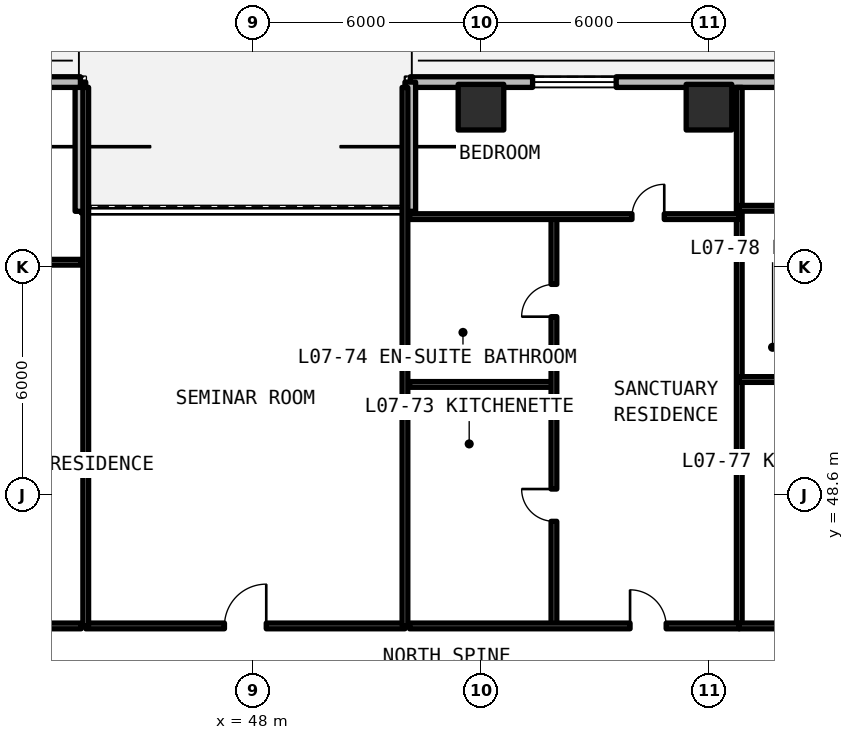
"""IFC4 building model, lengths in metres.
Left out: names, types, materials, properties, quantities, classifications, styles, units other than length and angle.
Written with IfcOpenShell. Run it as: python <this file> out.ifc"""

import sys

from ifc_helpers import new_model, si_unit, direction, frame, frame_2d, origin, origin_2d, place, context, subcontext, project, spatial, rectangle, extrude, element, fill, save


model = new_model("IFC4")
c1 = context("Model", 3, precision=1e-05, world=origin(), true_north=direction((0.0, 1.0)))
c2 = subcontext(c1, "Body", "Model", "MODEL_VIEW")
j1 = project(units=[si_unit("LENGTHUNIT", "METRE"), si_unit("PLANEANGLEUNIT", "RADIAN")], contexts=[c1])
p1 = place(None, origin())
s1 = spatial("IfcSite", under=j1, at=p1, CompositionType="ELEMENT")
p2 = place(p1, origin())
s2 = spatial("IfcBuilding", under=s1, at=p2, CompositionType="ELEMENT")
p3 = place(p2, frame((0.0, 0.0, 29.04)))
s3 = spatial("IfcBuildingStorey", under=s2, at=p3, CompositionType="ELEMENT", Elevation=29.04)
for number, where, z_axis, x_axis in (
    (1, (54.0, 58.8, -0.24), (0.0, 0.0, 1.0), (1.0, 0.0, 0.0)),
    (2, (60.0, 58.8, -0.24), (0.0, 0.0, 1.0), (1.0, 0.0, 0.0)),
):
    element("IfcColumn", number, at=place(p3, frame(where, z_axis=z_axis, x_axis=x_axis)), inside=s3, PredefinedType="COLUMN", context=c2, shape_type="SweptSolid", body=[
        extrude(rectangle(XDim=1.2, YDim=1.2, at=origin_2d()), origin(), (0.0, 0.0, 1.0), 3.54),
    ])
p4 = place(p3, frame((96.542, 59.46, 0.0), z_axis=(0.0, 0.0, 1.0), x_axis=(-1.0, 0.0, 0.0)))
e3 = element("IfcWall", 3, at=p4, inside=s3, PredefinedType="SOLIDWALL", context=c2, shape_type="SweptSolid", body=[
    extrude(rectangle(XDim=44.402, YDim=0.28, at=frame_2d((22.201, 0.0))), origin(), (0.0, 0.0, 1.0), 3.08),
])
p5 = place(p4, frame((38.984, 0.0, 0.78)))
e4 = element("IfcOpeningElement", 4, at=p5, cuts=e3, PredefinedType="OPENING", context=c2, shape_type="SweptSolid", body=[
    extrude(rectangle(XDim=2.2, YDim=1.66, at=frame_2d((1.1, 0.83))), frame((0.0, 0.15, 0.0), z_axis=(0.0, -1.0, 0.0), x_axis=(1.0, 0.0, 0.0)), (0.0, 0.0, 1.0), 0.3),
])
p6 = place(p4, frame((31.448, 0.0, 0.78)))
e5 = element("IfcOpeningElement", 5, at=p6, cuts=e3, PredefinedType="OPENING", context=c2, shape_type="SweptSolid", body=[
    extrude(rectangle(XDim=2.2, YDim=1.66, at=frame_2d((1.1, 0.83))), frame((0.0, 0.15, 0.0), z_axis=(0.0, -1.0, 0.0), x_axis=(1.0, 0.0, 0.0)), (0.0, 0.0, 1.0), 0.3),
])
p7 = place(p4, frame((21.032, 0.0, 0.78)))
e6 = element("IfcOpeningElement", 6, at=p7, cuts=e3, PredefinedType="OPENING", context=c2, shape_type="SweptSolid", body=[
    extrude(rectangle(XDim=2.2, YDim=1.66, at=frame_2d((1.1, 0.83))), frame((0.0, 0.15, 0.0), z_axis=(0.0, -1.0, 0.0), x_axis=(1.0, 0.0, 0.0)), (0.0, 0.0, 1.0), 0.3),
])
p8 = place(p4, frame((13.326, 0.0, 0.78)))
e7 = element("IfcOpeningElement", 7, at=p8, cuts=e3, PredefinedType="OPENING", context=c2, shape_type="SweptSolid", body=[
    extrude(rectangle(XDim=2.2, YDim=1.66, at=frame_2d((1.1, 0.83))), frame((0.0, 0.15, 0.0), z_axis=(0.0, -1.0, 0.0), x_axis=(1.0, 0.0, 0.0)), (0.0, 0.0, 1.0), 0.3),
])
p9 = place(p4, frame((3.38, 0.0, 0.78)))
e8 = element("IfcOpeningElement", 8, at=p9, cuts=e3, PredefinedType="OPENING", context=c2, shape_type="SweptSolid", body=[
    extrude(rectangle(XDim=2.2, YDim=1.66, at=frame_2d((1.1, 0.83))), frame((0.0, 0.15, 0.0), z_axis=(0.0, -1.0, 0.0), x_axis=(1.0, 0.0, 0.0)), (0.0, 0.0, 1.0), 0.3),
])
for number, where, z_axis, x_axis in (
    (9, (52.14, 59.46, 0.0), (0.0, 0.0, 1.0), (0.0, -1.0, 0.0)),
    (10, (43.46, 56.06, 0.0), (0.0, 0.0, 1.0), (0.0, 1.0, 0.0)),
):
    element("IfcWall", number, at=place(p3, frame(where, z_axis=z_axis, x_axis=x_axis)), inside=s3, PredefinedType="SOLIDWALL", context=c2, shape_type="SweptSolid", body=[
        extrude(rectangle(XDim=3.4, YDim=0.28, at=frame_2d((1.7, 0.0))), origin(), (0.0, 0.0, 1.0), 3.08),
    ])
p10 = place(p3, frame((43.46, 59.46, 0.0), z_axis=(0.0, 0.0, 1.0), x_axis=(-1.0, 0.0, 0.0)))
e11 = element("IfcWall", 11, at=p10, inside=s3, PredefinedType="SOLIDWALL", context=c2, shape_type="SweptSolid", body=[
    extrude(rectangle(XDim=22.602, YDim=0.28, at=frame_2d((11.301, 0.0))), origin(), (0.0, 0.0, 1.0), 3.08),
])
p11 = place(p10, frame((9.551, 0.0, 0.0)))
e12 = element("IfcOpeningElement", 12, at=p11, cuts=e11, PredefinedType="OPENING", context=c2, shape_type="SweptSolid", body=[
    extrude(rectangle(XDim=1.5, YDim=2.2, at=frame_2d((0.75, 1.1))), frame((0.0, 0.15, 0.0), z_axis=(0.0, -1.0, 0.0), x_axis=(1.0, 0.0, 0.0)), (0.0, 0.0, 1.0), 0.3),
])
p12 = place(p10, frame((20.346, 0.0, 0.78)))
e13 = element("IfcOpeningElement", 13, at=p12, cuts=e11, PredefinedType="OPENING", context=c2, shape_type="SweptSolid", body=[
    extrude(rectangle(XDim=1.4, YDim=1.65, at=frame_2d((0.7, 0.825))), frame((0.0, 0.15, 0.0), z_axis=(0.0, -1.0, 0.0), x_axis=(1.0, 0.0, 0.0)), (0.0, 0.0, 1.0), 0.3),
])
p13 = place(p10, frame((15.999, 0.0, 0.78)))
e14 = element("IfcOpeningElement", 14, at=p13, cuts=e11, PredefinedType="OPENING", context=c2, shape_type="SweptSolid", body=[
    extrude(rectangle(XDim=0.85, YDim=1.65, at=frame_2d((0.425, 0.825))), frame((0.0, 0.15, 0.0), z_axis=(0.0, -1.0, 0.0), x_axis=(1.0, 0.0, 0.0)), (0.0, 0.0, 1.0), 0.3),
])
p14 = place(p10, frame((14.163, 0.0, 0.78)))
e15 = element("IfcOpeningElement", 15, at=p14, cuts=e11, PredefinedType="OPENING", context=c2, shape_type="SweptSolid", body=[
    extrude(rectangle(XDim=0.85, YDim=1.65, at=frame_2d((0.425, 0.825))), frame((0.0, 0.15, 0.0), z_axis=(0.0, -1.0, 0.0), x_axis=(1.0, 0.0, 0.0)), (0.0, 0.0, 1.0), 0.3),
])
p15 = place(p10, frame((2.368, 0.0, 0.78)))
e16 = element("IfcOpeningElement", 16, at=p15, cuts=e11, PredefinedType="OPENING", context=c2, shape_type="SweptSolid", body=[
    extrude(rectangle(XDim=2.2, YDim=1.66, at=frame_2d((1.1, 0.83))), frame((0.0, 0.15, 0.0), z_axis=(0.0, -1.0, 0.0), x_axis=(1.0, 0.0, 0.0)), (0.0, 0.0, 1.0), 0.3),
])
p16 = place(p3, frame((43.6, 45.15, 0.0), z_axis=(0.0, 0.0, 1.0), x_axis=(1.0, 0.0, 0.0)))
e17 = element("IfcWall", 17, at=p16, inside=s3, PredefinedType="SOLIDWALL", context=c2, shape_type="SweptSolid", body=[
    extrude(rectangle(XDim=8.4, YDim=0.15, at=frame_2d((4.2, 0.0))), origin(), (0.0, 0.0, 1.0), 2.35),
])
p17 = place(p16, frame((3.65, 0.0, 0.0)))
e18 = element("IfcOpeningElement", 18, at=p17, cuts=e17, PredefinedType="OPENING", context=c2, shape_type="SweptSolid", body=[
    extrude(rectangle(XDim=1.1, YDim=2.15, at=frame_2d((0.55, 1.075))), frame((0.0, 0.085, 0.0), z_axis=(0.0, -1.0, 0.0), x_axis=(1.0, 0.0, 0.0)), (0.0, 0.0, 1.0), 0.17),
])
for number, where, z_axis, x_axis in (
    (19, (43.6, 45.15, 0.0), (0.0, 0.0, 1.0), (0.0, 1.0, 0.0)),
    (20, (52.0, 45.15, 0.0), (0.0, 0.0, 1.0), (0.0, 1.0, 0.0)),
):
    element("IfcWall", number, at=place(p3, frame(where, z_axis=z_axis, x_axis=x_axis)), inside=s3, PredefinedType="SOLIDWALL", context=c2, shape_type="SweptSolid", body=[
        extrude(rectangle(XDim=14.17, YDim=0.15, at=frame_2d((7.085, 0.0))), origin(), (0.0, 0.0, 1.0), 2.35),
    ])
p18 = place(p3, frame((37.144, 54.72, 0.0), z_axis=(0.0, 0.0, 1.0), x_axis=(1.0, 0.0, 0.0)))
e21 = element("IfcWall", 21, at=p18, inside=s3, PredefinedType="PARTITIONING", context=c2, shape_type="SweptSolid", body=[
    extrude(rectangle(XDim=6.336, YDim=0.15, at=frame_2d((3.168, 0.0))), origin(), (0.0, 0.0, 1.0), 2.35),
])
p19 = place(p18, frame((3.86, 0.0, 0.0)))
e22 = element("IfcOpeningElement", 22, at=p19, cuts=e21, PredefinedType="OPENING", context=c2, shape_type="SweptSolid", body=[
    extrude(rectangle(XDim=0.85, YDim=2.1, at=frame_2d((0.425, 1.05))), frame((0.0, 0.085, 0.0), z_axis=(0.0, -1.0, 0.0), x_axis=(1.0, 0.0, 0.0)), (0.0, 0.0, 1.0), 0.17),
])
p20 = place(p3, frame((37.144, 45.15, 0.0), z_axis=(0.0, 0.0, 1.0), x_axis=(1.0, 0.0, 0.0)))
e23 = element("IfcWall", 23, at=p20, inside=s3, PredefinedType="SOLIDWALL", context=c2, shape_type="SweptSolid", body=[
    extrude(rectangle(XDim=6.336, YDim=0.15, at=frame_2d((3.168, 0.0))), origin(), (0.0, 0.0, 1.0), 2.35),
])
p21 = place(p20, frame((3.81, 0.0, 0.0)))
e24 = element("IfcOpeningElement", 24, at=p21, cuts=e23, PredefinedType="OPENING", context=c2, shape_type="SweptSolid", body=[
    extrude(rectangle(XDim=0.95, YDim=2.15, at=frame_2d((0.475, 1.075))), frame((0.0, 0.085, 0.0), z_axis=(0.0, -1.0, 0.0), x_axis=(1.0, 0.0, 0.0)), (0.0, 0.0, 1.0), 0.17),
])
p22 = place(p3, frame((60.796, 45.15, 0.0), z_axis=(0.0, 0.0, 1.0), x_axis=(0.0, 1.0, 0.0)))
e25 = element("IfcWall", 25, at=p22, inside=s3, PredefinedType="SOLIDWALL", context=c2, shape_type="SweptSolid", body=[
    extrude(rectangle(XDim=14.17, YDim=0.15, at=frame_2d((7.085, 0.0))), origin(), (0.0, 0.0, 1.0), 2.35),
])
p23 = place(p3, frame((52.12, 51.504, 0.0), z_axis=(0.0, 0.0, 1.0), x_axis=(1.0, 0.0, 0.0)))
e26 = element("IfcWall", 26, at=p23, inside=s3, PredefinedType="PARTITIONING", context=c2, shape_type="SweptSolid", body=[
    extrude(rectangle(XDim=3.8, YDim=0.15, at=frame_2d((1.9, 0.0))), origin(), (0.0, 0.0, 1.0), 2.35),
])
p24 = place(p3, frame((55.92, 45.15, 0.0), z_axis=(0.0, 0.0, 1.0), x_axis=(0.0, 1.0, 0.0)))
e27 = element("IfcWall", 27, at=p24, inside=s3, PredefinedType="PARTITIONING", context=c2, shape_type="SweptSolid", body=[
    extrude(rectangle(XDim=10.77, YDim=0.15, at=frame_2d((5.385, 0.0))), origin(), (0.0, 0.0, 1.0), 2.35),
])
p25 = place(p24, frame((2.752, 0.0, 0.0)))
e28 = element("IfcOpeningElement", 28, at=p25, cuts=e27, PredefinedType="OPENING", context=c2, shape_type="SweptSolid", body=[
    extrude(rectangle(XDim=0.85, YDim=2.1, at=frame_2d((0.425, 1.05))), frame((0.0, 0.085, 0.0), z_axis=(0.0, -1.0, 0.0), x_axis=(1.0, 0.0, 0.0)), (0.0, 0.0, 1.0), 0.17),
])
p26 = place(p24, frame((8.137, 0.0, 0.0)))
e29 = element("IfcOpeningElement", 29, at=p26, cuts=e27, PredefinedType="OPENING", context=c2, shape_type="SweptSolid", body=[
    extrude(rectangle(XDim=0.85, YDim=2.1, at=frame_2d((0.425, 1.05))), frame((0.0, 0.085, 0.0), z_axis=(0.0, -1.0, 0.0), x_axis=(1.0, 0.0, 0.0)), (0.0, 0.0, 1.0), 0.17),
])
p27 = place(p3, frame((52.12, 55.92, 0.0), z_axis=(0.0, 0.0, 1.0), x_axis=(1.0, 0.0, 0.0)))
e30 = element("IfcWall", 30, at=p27, inside=s3, PredefinedType="PARTITIONING", context=c2, shape_type="SweptSolid", body=[
    extrude(rectangle(XDim=8.676, YDim=0.15, at=frame_2d((4.338, 0.0))), origin(), (0.0, 0.0, 1.0), 2.35),
])
p28 = place(p27, frame((5.853, 0.0, 0.0)))
e31 = element("IfcOpeningElement", 31, at=p28, cuts=e30, PredefinedType="OPENING", context=c2, shape_type="SweptSolid", body=[
    extrude(rectangle(XDim=0.85, YDim=2.1, at=frame_2d((0.425, 1.05))), frame((0.0, 0.085, 0.0), z_axis=(0.0, -1.0, 0.0), x_axis=(1.0, 0.0, 0.0)), (0.0, 0.0, 1.0), 0.17),
])
p29 = place(p3, frame((52.12, 45.15, 0.0), z_axis=(0.0, 0.0, 1.0), x_axis=(1.0, 0.0, 0.0)))
e32 = element("IfcWall", 32, at=p29, inside=s3, PredefinedType="SOLIDWALL", context=c2, shape_type="SweptSolid", body=[
    extrude(rectangle(XDim=8.676, YDim=0.15, at=frame_2d((4.338, 0.0))), origin(), (0.0, 0.0, 1.0), 2.35),
])
p30 = place(p29, frame((5.803, 0.0, 0.0)))
e33 = element("IfcOpeningElement", 33, at=p30, cuts=e32, PredefinedType="OPENING", context=c2, shape_type="SweptSolid", body=[
    extrude(rectangle(XDim=0.95, YDim=2.15, at=frame_2d((0.475, 1.075))), frame((0.0, 0.085, 0.0), z_axis=(0.0, -1.0, 0.0), x_axis=(1.0, 0.0, 0.0)), (0.0, 0.0, 1.0), 0.17),
])
p31 = place(p3, frame((60.796, 51.634, 0.0), z_axis=(0.0, 0.0, 1.0), x_axis=(1.0, 0.0, 0.0)))
e34 = element("IfcWall", 34, at=p31, inside=s3, PredefinedType="PARTITIONING", context=c2, shape_type="SweptSolid", body=[
    extrude(rectangle(XDim=2.35, YDim=0.15, at=frame_2d((1.175, 0.0))), origin(), (0.0, 0.0, 1.0), 2.35),
])
p32 = place(p3, frame((60.796, 56.139, 0.0), z_axis=(0.0, 0.0, 1.0), x_axis=(1.0, 0.0, 0.0)))
e35 = element("IfcWall", 35, at=p32, inside=s3, PredefinedType="PARTITIONING", context=c2, shape_type="SweptSolid", body=[
    extrude(rectangle(XDim=9.275, YDim=0.15, at=frame_2d((4.637, 0.0))), origin(), (0.0, 0.0, 1.0), 2.35),
])
p33 = place(p32, frame((5.427, 0.0, 0.0)))
e36 = element("IfcOpeningElement", 36, at=p33, cuts=e35, PredefinedType="OPENING", context=c2, shape_type="SweptSolid", body=[
    extrude(rectangle(XDim=0.85, YDim=2.1, at=frame_2d((0.425, 1.05))), frame((0.0, 0.085, 0.0), z_axis=(0.0, -1.0, 0.0), x_axis=(1.0, 0.0, 0.0)), (0.0, 0.0, 1.0), 0.17),
])
p34 = place(p3, frame((60.796, 45.15, 0.0), z_axis=(0.0, 0.0, 1.0), x_axis=(1.0, 0.0, 0.0)))
e37 = element("IfcWall", 37, at=p34, inside=s3, PredefinedType="SOLIDWALL", context=c2, shape_type="SweptSolid", body=[
    extrude(rectangle(XDim=9.275, YDim=0.15, at=frame_2d((4.637, 0.0))), origin(), (0.0, 0.0, 1.0), 2.35),
])
p35 = place(p34, frame((5.377, 0.0, 0.0)))
e38 = element("IfcOpeningElement", 38, at=p35, cuts=e37, PredefinedType="OPENING", context=c2, shape_type="SweptSolid", body=[
    extrude(rectangle(XDim=0.95, YDim=2.15, at=frame_2d((0.475, 1.075))), frame((0.0, 0.085, 0.0), z_axis=(0.0, -1.0, 0.0), x_axis=(1.0, 0.0, 0.0)), (0.0, 0.0, 1.0), 0.17),
])
p36 = place(p5, origin())
e39 = element("IfcWindow", 39, at=p36, inside=s3, PartitioningType="SINGLE_PANEL", PredefinedType="WINDOW", context=c2, shape_type="SweptSolid", body=[
    extrude(rectangle(XDim=2.2, YDim=1.66, at=frame_2d((1.1, 0.83))), frame((0.0, 0.03, 0.0), z_axis=(0.0, -1.0, 0.0), x_axis=(1.0, 0.0, 0.0)), (0.0, 0.0, 1.0), 0.06),
])
fill(e4, e39)
p37 = place(p17, origin())
e40 = element("IfcDoor", 40, at=p37, inside=s3, OperationType="SINGLE_SWING_RIGHT", PredefinedType="DOOR", context=c2, shape_type="SweptSolid", body=[
    extrude(rectangle(XDim=1.1, YDim=2.15, at=frame_2d((0.55, 1.075))), frame((0.0, 0.025, 0.0), z_axis=(0.0, -1.0, 0.0), x_axis=(1.0, 0.0, 0.0)), (0.0, 0.0, 1.0), 0.05),
])
fill(e18, e40)
p38 = place(p25, origin())
e41 = element("IfcDoor", 41, at=p38, inside=s3, OperationType="SINGLE_SWING_RIGHT", PredefinedType="DOOR", context=c2, shape_type="SweptSolid", body=[
    extrude(rectangle(XDim=0.85, YDim=2.1, at=frame_2d((0.425, 1.05))), frame((0.0, 0.025, 0.0), z_axis=(0.0, -1.0, 0.0), x_axis=(1.0, 0.0, 0.0)), (0.0, 0.0, 1.0), 0.05),
])
fill(e28, e41)
p39 = place(p26, origin())
e42 = element("IfcDoor", 42, at=p39, inside=s3, OperationType="SINGLE_SWING_LEFT", PredefinedType="DOOR", context=c2, shape_type="SweptSolid", body=[
    extrude(rectangle(XDim=0.85, YDim=2.1, at=frame_2d((0.425, 1.05))), frame((0.0, 0.025, 0.0), z_axis=(0.0, -1.0, 0.0), x_axis=(1.0, 0.0, 0.0)), (0.0, 0.0, 1.0), 0.05),
])
fill(e29, e42)
p40 = place(p28, origin())
e43 = element("IfcDoor", 43, at=p40, inside=s3, OperationType="SINGLE_SWING_RIGHT", PredefinedType="DOOR", context=c2, shape_type="SweptSolid", body=[
    extrude(rectangle(XDim=0.85, YDim=2.1, at=frame_2d((0.425, 1.05))), frame((0.0, 0.025, 0.0), z_axis=(0.0, -1.0, 0.0), x_axis=(1.0, 0.0, 0.0)), (0.0, 0.0, 1.0), 0.05),
])
fill(e31, e43)
p41 = place(p30, origin())
e44 = element("IfcDoor", 44, at=p41, inside=s3, OperationType="SINGLE_SWING_LEFT", PredefinedType="DOOR", context=c2, shape_type="SweptSolid", body=[
    extrude(rectangle(XDim=0.95, YDim=2.15, at=frame_2d((0.475, 1.075))), frame((0.0, 0.025, 0.0), z_axis=(0.0, -1.0, 0.0), x_axis=(1.0, 0.0, 0.0)), (0.0, 0.0, 1.0), 0.05),
])
fill(e33, e44)
save(model, sys.argv[1])
